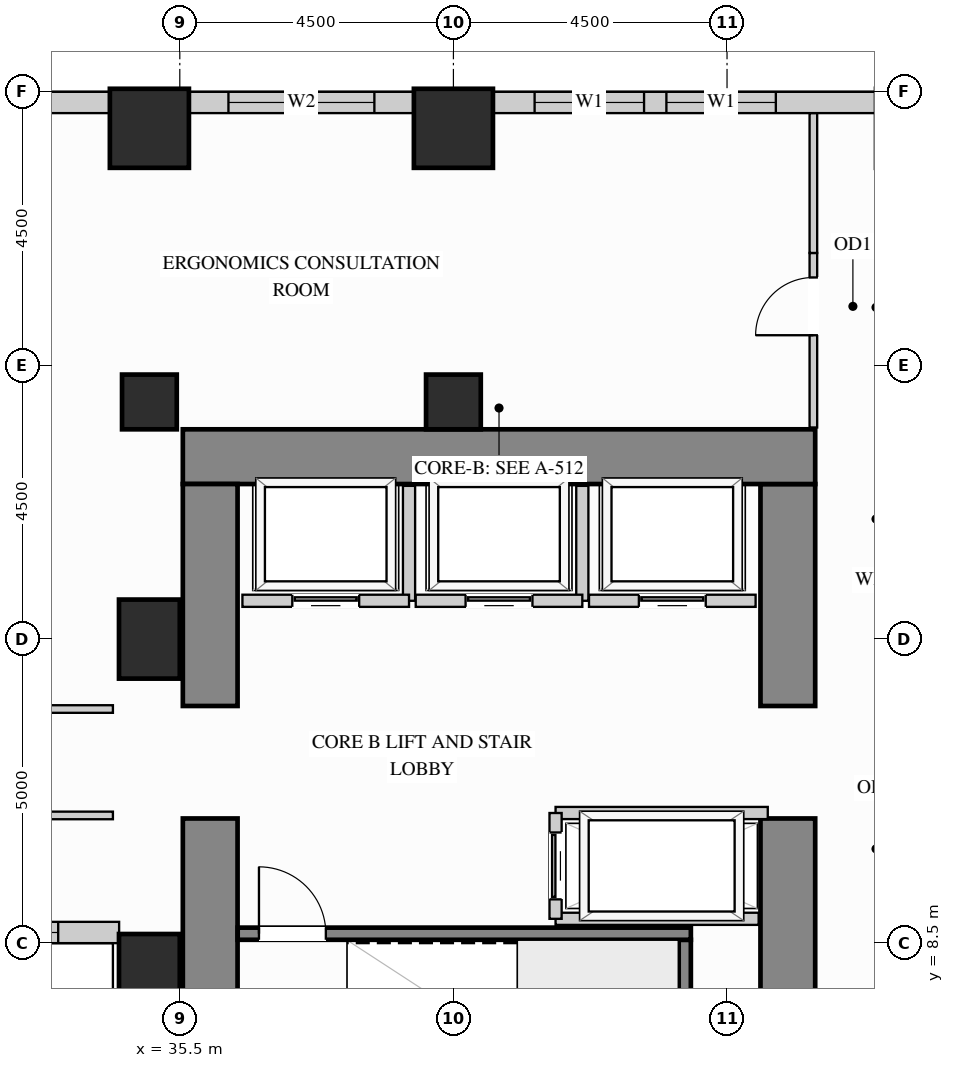
"""IFC4 building model, lengths in metres.
Left out: names, types, materials, properties, quantities, classifications, styles, units other than length and angle.
Written with IfcOpenShell. Run it as: python <this file> out.ifc"""

import sys

from ifc_helpers import new_model, si_unit, direction, frame, frame_2d, origin, origin_2d, place, context, subcontext, project, spatial, rectangle, extrude, source, transform, mapped, element, fill, save


model = new_model("IFC4")
c1 = context("Model", 3, precision=1e-05, world=origin(), true_north=direction((0.0, 1.0)))
c2 = subcontext(c1, "Body", "Model", "MODEL_VIEW")
j1 = project(units=[si_unit("LENGTHUNIT", "METRE"), si_unit("PLANEANGLEUNIT", "RADIAN")], contexts=[c1])
p1 = place(None, origin())
s1 = spatial("IfcSite", under=j1, at=p1, CompositionType="ELEMENT")
p2 = place(p1, origin())
s2 = spatial("IfcBuilding", under=s1, at=p2, CompositionType="ELEMENT")
p3 = place(p2, frame((0.0, 0.0, 33.3)))
s3 = spatial("IfcBuildingStorey", under=s2, at=p3, CompositionType="ELEMENT", Elevation=33.3)
m1 = source(origin(), c2, "Body", "SweptSolid", [
    extrude(rectangle(XDim=0.9, YDim=0.9, at=origin_2d()), origin(), (0.0, 0.0, 1.0), 3.38),
])
for number, where, z_axis, x_axis in (
    (1, (35.0, 17.4, 0.0), (0.0, 0.0, 1.0), (1.0, 0.0, 0.0)),
    (2, (40.0, 17.4, 0.0), (0.0, 0.0, 1.0), (1.0, 0.0, 0.0)),
):
    element("IfcColumn", number, at=place(p3, frame(where, z_axis=z_axis, x_axis=x_axis)), inside=s3, PredefinedType="COLUMN", context=c2, shape_type="MappedRepresentation", body=[
        mapped(m1, transform((0.0, 0.0, 0.0), x_axis=(1.0, 0.0, 0.0), y_axis=(0.0, 1.0, 0.0), z_axis=(0.0, 0.0, 1.0))),
    ])
m2 = source(origin(), c2, "Body", "SweptSolid", [
    extrude(rectangle(XDim=1.0, YDim=1.3, at=origin_2d()), origin(), (0.0, 0.0, 1.0), 3.38),
])
for number, where, z_axis, x_axis in (
    (3, (35.0, 13.5, 0.0), (0.0, 0.0, 1.0), (1.0, 0.0, 0.0)),
    (4, (35.0, 8.0, 0.0), (0.0, 0.0, 1.0), (1.0, 0.0, 0.0)),
):
    element("IfcColumn", number, at=place(p3, frame(where, z_axis=z_axis, x_axis=x_axis)), inside=s3, PredefinedType="COLUMN", context=c2, shape_type="MappedRepresentation", body=[
        mapped(m2, transform((0.0, 0.0, 0.0), x_axis=(1.0, 0.0, 0.0), y_axis=(0.0, 1.0, 0.0), z_axis=(0.0, 0.0, 1.0))),
    ])
m3 = source(origin(), c2, "Body", "SweptSolid", [
    extrude(rectangle(XDim=1.3, YDim=1.3, at=origin_2d()), origin(), (0.0, 0.0, 1.0), 3.38),
])
for number, where, z_axis, x_axis in (
    (5, (35.0, 21.9, 0.0), (0.0, 0.0, 1.0), (1.0, 0.0, 0.0)),
    (6, (40.0, 21.9, 0.0), (0.0, 0.0, 1.0), (1.0, 0.0, 0.0)),
):
    element("IfcColumn", number, at=place(p3, frame(where, z_axis=z_axis, x_axis=x_axis)), inside=s3, PredefinedType="COLUMN", context=c2, shape_type="MappedRepresentation", body=[
        mapped(m3, transform((0.0, 0.0, 0.0), x_axis=(1.0, 0.0, 0.0), y_axis=(0.0, 1.0, 0.0), z_axis=(0.0, 0.0, 1.0))),
    ])
m4 = source(origin(), c2, "Body", "SweptSolid", [
    extrude(rectangle(XDim=5.6, YDim=0.9, at=frame_2d((2.8, 0.0))), origin(), (0.0, 0.0, 1.0), 3.38),
])
p4 = place(p3, frame((45.5, 4.95, 0.0), z_axis=(0.0, 0.0, 1.0), x_axis=(0.0, 1.0, 0.0)))
e7 = element("IfcWall", 7, at=p4, inside=s3, PredefinedType="SHEAR", context=c2, shape_type="MappedRepresentation", body=[
    mapped(m4, transform((0.0, 0.0, 0.0), x_axis=(1.0, 0.0, 0.0), y_axis=(0.0, 1.0, 0.0), z_axis=(0.0, 0.0, 1.0))),
])
m5 = source(origin(), c2, "Body", "SweptSolid", [
    extrude(rectangle(XDim=3.65, YDim=0.9, at=frame_2d((1.825, 0.0))), origin(), (0.0, 0.0, 1.0), 3.38),
])
p5 = place(p3, frame((45.5, 12.4, 0.0), z_axis=(0.0, 0.0, 1.0), x_axis=(0.0, 1.0, 0.0)))
e8 = element("IfcWall", 8, at=p5, inside=s3, PredefinedType="SHEAR", context=c2, shape_type="MappedRepresentation", body=[
    mapped(m5, transform((0.0, 0.0, 0.0), x_axis=(1.0, 0.0, 0.0), y_axis=(0.0, 1.0, 0.0), z_axis=(0.0, 0.0, 1.0))),
])
m6 = source(origin(), c2, "Body", "SweptSolid", [
    extrude(rectangle(XDim=10.4, YDim=0.9, at=frame_2d((5.2, 0.0))), origin(), (0.0, 0.0, 1.0), 3.38),
])
p6 = place(p3, frame((35.55, 16.5, 0.0), z_axis=(0.0, 0.0, 1.0), x_axis=(1.0, 0.0, 0.0)))
e9 = element("IfcWall", 9, at=p6, inside=s3, PredefinedType="SHEAR", context=c2, shape_type="MappedRepresentation", body=[
    mapped(m6, transform((0.0, 0.0, 0.0), x_axis=(1.0, 0.0, 0.0), y_axis=(0.0, 1.0, 0.0), z_axis=(0.0, 0.0, 1.0))),
])
p7 = place(p3, frame((36.0, 4.95, 0.0), z_axis=(0.0, 0.0, 1.0), x_axis=(0.0, 1.0, 0.0)))
e10 = element("IfcWall", 10, at=p7, inside=s3, PredefinedType="SHEAR", context=c2, shape_type="MappedRepresentation", body=[
    mapped(m4, transform((0.0, 0.0, 0.0), x_axis=(1.0, 0.0, 0.0), y_axis=(0.0, 1.0, 0.0), z_axis=(0.0, 0.0, 1.0))),
])
p8 = place(p3, frame((36.0, 12.4, 0.0), z_axis=(0.0, 0.0, 1.0), x_axis=(0.0, 1.0, 0.0)))
e11 = element("IfcWall", 11, at=p8, inside=s3, PredefinedType="SHEAR", context=c2, shape_type="MappedRepresentation", body=[
    mapped(m5, transform((0.0, 0.0, 0.0), x_axis=(1.0, 0.0, 0.0), y_axis=(0.0, 1.0, 0.0), z_axis=(0.0, 0.0, 1.0))),
])
p9 = place(p3, frame((30.998, 8.675, 0.0), z_axis=(0.0, 0.0, 1.0), x_axis=(1.0, 0.0, 0.0)))
e12 = element("IfcWall", 12, at=p9, inside=s3, PredefinedType="SOLIDWALL", context=c2, shape_type="SweptSolid", body=[
    extrude(rectangle(XDim=3.504, YDim=0.35, at=frame_2d((1.752, 0.0))), origin(), (0.0, 0.0, 1.0), 3.365),
])
p10 = place(p9, frame((1.002, 0.0, 0.78)))
e13 = element("IfcOpeningElement", 13, at=p10, cuts=e12, PredefinedType="OPENING", context=c2, shape_type="SweptSolid", body=[
    extrude(rectangle(XDim=1.5, YDim=2.0, at=frame_2d((0.75, 1.0))), frame((0.0, 0.185, 0.0), z_axis=(0.0, -1.0, 0.0), x_axis=(1.0, 0.0, 0.0)), (0.0, 0.0, 1.0), 0.37),
])
p11 = place(p3, frame((46.952, 22.325, 0.0), z_axis=(0.0, 0.0, 1.0), x_axis=(-1.0, 0.0, 0.0)))
e14 = element("IfcWall", 14, at=p11, inside=s3, PredefinedType="SOLIDWALL", context=c2, shape_type="SweptSolid", body=[
    extrude(rectangle(XDim=6.304, YDim=0.35, at=frame_2d((3.152, 0.0))), origin(), (0.0, 0.0, 1.0), 2.51),
])
p12 = place(p11, frame((1.649, 0.0, 0.78)))
e15 = element("IfcOpeningElement", 15, at=p12, cuts=e14, PredefinedType="OPENING", context=c2, shape_type="SweptSolid", body=[
    extrude(rectangle(XDim=1.8, YDim=1.55, at=frame_2d((0.9, 0.775))), frame((0.0, 0.185, 0.0), z_axis=(0.0, -1.0, 0.0), x_axis=(1.0, 0.0, 0.0)), (0.0, 0.0, 1.0), 0.37),
])
p13 = place(p11, frame((3.817, 0.0, 0.78)))
e16 = element("IfcOpeningElement", 16, at=p13, cuts=e14, PredefinedType="OPENING", context=c2, shape_type="SweptSolid", body=[
    extrude(rectangle(XDim=1.8, YDim=1.55, at=frame_2d((0.9, 0.775))), frame((0.0, 0.185, 0.0), z_axis=(0.0, -1.0, 0.0), x_axis=(1.0, 0.0, 0.0)), (0.0, 0.0, 1.0), 0.37),
])
p14 = place(p3, frame((39.352, 22.325, 0.0), z_axis=(0.0, 0.0, 1.0), x_axis=(-1.0, 0.0, 0.0)))
e17 = element("IfcWall", 17, at=p14, inside=s3, PredefinedType="SOLIDWALL", context=c2, shape_type="SweptSolid", body=[
    extrude(rectangle(XDim=3.704, YDim=0.35, at=frame_2d((1.852, 0.0))), origin(), (0.0, 0.0, 1.0), 2.51),
])
p15 = place(p14, frame((0.652, 0.0, 0.78)))
e18 = element("IfcOpeningElement", 18, at=p15, cuts=e17, PredefinedType="OPENING", context=c2, shape_type="SweptSolid", body=[
    extrude(rectangle(XDim=2.4, YDim=1.55, at=frame_2d((1.2, 0.775))), frame((0.0, 0.185, 0.0), z_axis=(0.0, -1.0, 0.0), x_axis=(1.0, 0.0, 0.0)), (0.0, 0.0, 1.0), 0.37),
])
p16 = place(p3, frame((34.352, 22.325, 0.0), z_axis=(0.0, 0.0, 1.0), x_axis=(-1.0, 0.0, 0.0)))
e19 = element("IfcWall", 19, at=p16, inside=s3, PredefinedType="SOLIDWALL", context=c2, shape_type="SweptSolid", body=[
    extrude(rectangle(XDim=14.854, YDim=0.35, at=frame_2d((7.427, 0.0))), origin(), (0.0, 0.0, 1.0), 3.365),
])
p17 = place(p16, frame((4.058, 0.0, 0.78)))
e20 = element("IfcOpeningElement", 20, at=p17, cuts=e19, PredefinedType="OPENING", context=c2, shape_type="SweptSolid", body=[
    extrude(rectangle(XDim=1.5, YDim=2.0, at=frame_2d((0.75, 1.0))), frame((0.0, 0.185, 0.0), z_axis=(0.0, -1.0, 0.0), x_axis=(1.0, 0.0, 0.0)), (0.0, 0.0, 1.0), 0.37),
])
p18 = place(p16, frame((9.296, 0.0, 0.78)))
e21 = element("IfcOpeningElement", 21, at=p18, cuts=e19, PredefinedType="OPENING", context=c2, shape_type="SweptSolid", body=[
    extrude(rectangle(XDim=1.5, YDim=2.0, at=frame_2d((0.75, 1.0))), frame((0.0, 0.185, 0.0), z_axis=(0.0, -1.0, 0.0), x_axis=(1.0, 0.0, 0.0)), (0.0, 0.0, 1.0), 0.37),
])
p19 = place(p3, frame((45.92, 16.98, 0.0), z_axis=(0.0, 0.0, 1.0), x_axis=(0.0, 1.0, 0.0)))
e22 = element("IfcWall", 22, at=p19, inside=s3, PredefinedType="PARTITIONING", context=c2, shape_type="SweptSolid", body=[
    extrude(rectangle(XDim=2.87, YDim=0.125, at=frame_2d((1.435, 0.0))), origin(), (0.0, 0.0, 1.0), 3.365),
])
p20 = place(p19, frame((1.517, 0.0, 0.0)))
e23 = element("IfcOpeningElement", 23, at=p20, cuts=e22, PredefinedType="OPENING", context=c2, shape_type="SweptSolid", body=[
    extrude(rectangle(XDim=0.95, YDim=2.15, at=frame_2d((0.475, 1.075))), frame((0.0, 0.073, 0.0), z_axis=(0.0, -1.0, 0.0), x_axis=(1.0, 0.0, 0.0)), (0.0, 0.0, 1.0), 0.145),
])
m7 = source(origin(), c2, "Body", "SweptSolid", [
    extrude(rectangle(XDim=2.298, YDim=0.125, at=frame_2d((1.149, 0.0))), origin(), (0.0, 0.0, 1.0), 3.365),
])
p21 = place(p3, frame((45.92, 19.85, 0.0), z_axis=(0.0, 0.0, 1.0), x_axis=(0.0, 1.0, 0.0)))
e24 = element("IfcWall", 24, at=p21, inside=s3, PredefinedType="PARTITIONING", context=c2, shape_type="MappedRepresentation", body=[
    mapped(m7, transform((0.0, 0.0, 0.0), x_axis=(1.0, 0.0, 0.0), y_axis=(0.0, 1.0, 0.0), z_axis=(0.0, 0.0, 1.0))),
])
p22 = place(p3, frame((29.85, 12.35, 0.0), z_axis=(0.0, 0.0, 1.0), x_axis=(1.0, 0.0, 0.0)))
e25 = element("IfcWall", 25, at=p22, inside=s3, PredefinedType="PARTITIONING", context=c2, shape_type="SweptSolid", body=[
    extrude(rectangle(XDim=4.55, YDim=0.125, at=frame_2d((2.275, 0.0))), origin(), (0.0, 0.0, 1.0), 3.365),
])
p23 = place(p22, frame((1.8, 0.0, 0.0)))
e26 = element("IfcOpeningElement", 26, at=p23, cuts=e25, PredefinedType="OPENING", context=c2, shape_type="SweptSolid", body=[
    extrude(rectangle(XDim=0.95, YDim=2.15, at=frame_2d((0.475, 1.075))), frame((0.0, 0.073, 0.0), z_axis=(0.0, -1.0, 0.0), x_axis=(1.0, 0.0, 0.0)), (0.0, 0.0, 1.0), 0.145),
])
p24 = place(p3, frame((19.5, 10.6, 0.0), z_axis=(0.0, 0.0, 1.0), x_axis=(1.0, 0.0, 0.0)))
e27 = element("IfcWall", 27, at=p24, inside=s3, PredefinedType="PARTITIONING", context=c2, shape_type="SweptSolid", body=[
    extrude(rectangle(XDim=14.9, YDim=0.125, at=frame_2d((7.45, 0.0))), origin(), (0.0, 0.0, 1.0), 3.365),
])
p25 = place(p24, frame((6.975, 0.0, 0.0)))
e28 = element("IfcOpeningElement", 28, at=p25, cuts=e27, PredefinedType="OPENING", context=c2, shape_type="SweptSolid", body=[
    extrude(rectangle(XDim=0.95, YDim=2.15, at=frame_2d((0.475, 1.075))), frame((0.0, 0.073, 0.0), z_axis=(0.0, -1.0, 0.0), x_axis=(1.0, 0.0, 0.0)), (0.0, 0.0, 1.0), 0.145),
])
m8 = source(origin(), c2, "Body", "SweptSolid", [
    extrude(rectangle(XDim=1.89, YDim=0.2, at=frame_2d((0.945, 0.0))), origin(), (0.0, 0.0, 1.0), 3.365),
])
p26 = place(p3, frame((39.27, 14.13, 0.0), z_axis=(0.0, 0.0, 1.0), x_axis=(0.0, 1.0, 0.0)))
e29 = element("IfcWall", 29, at=p26, inside=s3, PredefinedType="PARTITIONING", context=c2, shape_type="MappedRepresentation", body=[
    mapped(m8, transform((0.0, 0.0, 0.0), x_axis=(1.0, 0.0, 0.0), y_axis=(0.0, 1.0, 0.0), z_axis=(0.0, 0.0, 1.0))),
])
p27 = place(p3, frame((36.53, 14.13, 0.0), z_axis=(0.0, 0.0, 1.0), x_axis=(1.0, 0.0, 0.0)))
e30 = element("IfcWall", 30, at=p27, inside=s3, PredefinedType="PARTITIONING", context=c2, shape_type="SweptSolid", body=[
    extrude(rectangle(XDim=2.74, YDim=0.2, at=frame_2d((1.37, 0.0))), origin(), (0.0, 0.0, 1.0), 3.365),
])
p28 = place(p27, frame((0.82, 0.0, 0.0)))
e31 = element("IfcOpeningElement", 31, at=p28, cuts=e30, PredefinedType="OPENING", context=c2, shape_type="SweptSolid", body=[
    extrude(rectangle(XDim=1.1, YDim=2.2, at=frame_2d((0.55, 1.1))), frame((0.0, 0.11, 0.0), z_axis=(0.0, -1.0, 0.0), x_axis=(1.0, 0.0, 0.0)), (0.0, 0.0, 1.0), 0.22),
])
p29 = place(p3, frame((42.12, 14.13, 0.0), z_axis=(0.0, 0.0, 1.0), x_axis=(0.0, 1.0, 0.0)))
e32 = element("IfcWall", 32, at=p29, inside=s3, PredefinedType="PARTITIONING", context=c2, shape_type="MappedRepresentation", body=[
    mapped(m8, transform((0.0, 0.0, 0.0), x_axis=(1.0, 0.0, 0.0), y_axis=(0.0, 1.0, 0.0), z_axis=(0.0, 0.0, 1.0))),
])
p30 = place(p3, frame((39.38, 14.13, 0.0), z_axis=(0.0, 0.0, 1.0), x_axis=(1.0, 0.0, 0.0)))
e33 = element("IfcWall", 33, at=p30, inside=s3, PredefinedType="PARTITIONING", context=c2, shape_type="SweptSolid", body=[
    extrude(rectangle(XDim=2.74, YDim=0.2, at=frame_2d((1.37, 0.0))), origin(), (0.0, 0.0, 1.0), 3.365),
])
p31 = place(p30, frame((0.82, 0.0, 0.0)))
e34 = element("IfcOpeningElement", 34, at=p31, cuts=e33, PredefinedType="OPENING", context=c2, shape_type="SweptSolid", body=[
    extrude(rectangle(XDim=1.1, YDim=2.2, at=frame_2d((0.55, 1.1))), frame((0.0, 0.11, 0.0), z_axis=(0.0, -1.0, 0.0), x_axis=(1.0, 0.0, 0.0)), (0.0, 0.0, 1.0), 0.22),
])
p32 = place(p3, frame((42.23, 14.13, 0.0), z_axis=(0.0, 0.0, 1.0), x_axis=(1.0, 0.0, 0.0)))
e35 = element("IfcWall", 35, at=p32, inside=s3, PredefinedType="PARTITIONING", context=c2, shape_type="SweptSolid", body=[
    extrude(rectangle(XDim=2.74, YDim=0.2, at=frame_2d((1.37, 0.0))), origin(), (0.0, 0.0, 1.0), 3.365),
])
p33 = place(p32, frame((0.82, 0.0, 0.0)))
e36 = element("IfcOpeningElement", 36, at=p33, cuts=e35, PredefinedType="OPENING", context=c2, shape_type="SweptSolid", body=[
    extrude(rectangle(XDim=1.1, YDim=2.2, at=frame_2d((0.55, 1.1))), frame((0.0, 0.11, 0.0), z_axis=(0.0, -1.0, 0.0), x_axis=(1.0, 0.0, 0.0)), (0.0, 0.0, 1.0), 0.22),
])
m9 = source(origin(), c2, "Body", "SweptSolid", [
    extrude(rectangle(XDim=3.49, YDim=0.2, at=frame_2d((1.745, 0.0))), origin(), (0.0, 0.0, 1.0), 3.365),
])
p34 = place(p3, frame((41.68, 10.64, 0.0), z_axis=(0.0, 0.0, 1.0), x_axis=(1.0, 0.0, 0.0)))
e37 = element("IfcWall", 37, at=p34, inside=s3, PredefinedType="PARTITIONING", context=c2, shape_type="MappedRepresentation", body=[
    mapped(m9, transform((0.0, 0.0, 0.0), x_axis=(1.0, 0.0, 0.0), y_axis=(0.0, 1.0, 0.0), z_axis=(0.0, 0.0, 1.0))),
])
m10 = source(origin(), c2, "Body", "SweptSolid", [
    extrude(rectangle(XDim=3.34, YDim=0.2, at=frame_2d((1.67, 0.0))), origin(), (0.0, 0.0, 1.0), 3.365),
])
p35 = place(p3, frame((41.68, 8.9, 0.0), z_axis=(0.0, 0.0, 1.0), x_axis=(1.0, 0.0, 0.0)))
e38 = element("IfcWall", 38, at=p35, inside=s3, PredefinedType="PARTITIONING", context=c2, shape_type="MappedRepresentation", body=[
    mapped(m10, transform((0.0, 0.0, 0.0), x_axis=(1.0, 0.0, 0.0), y_axis=(0.0, 1.0, 0.0), z_axis=(0.0, 0.0, 1.0))),
])
p36 = place(p3, frame((41.68, 8.9, 0.0), z_axis=(0.0, 0.0, 1.0), x_axis=(0.0, 1.0, 0.0)))
e39 = element("IfcWall", 39, at=p36, inside=s3, PredefinedType="PARTITIONING", context=c2, shape_type="SweptSolid", body=[
    extrude(rectangle(XDim=1.74, YDim=0.2, at=frame_2d((0.87, 0.0))), origin(), (0.0, 0.0, 1.0), 3.365),
])
p37 = place(p36, frame((0.32, 0.0, 0.0)))
e40 = element("IfcOpeningElement", 40, at=p37, cuts=e39, PredefinedType="OPENING", context=c2, shape_type="SweptSolid", body=[
    extrude(rectangle(XDim=1.1, YDim=2.2, at=frame_2d((0.55, 1.1))), frame((0.0, 0.11, 0.0), z_axis=(0.0, -1.0, 0.0), x_axis=(1.0, 0.0, 0.0)), (0.0, 0.0, 1.0), 0.22),
])
m11 = source(origin(), c2, "Body", "SweptSolid", [
    extrude(rectangle(XDim=3.603, YDim=0.2, at=frame_2d((1.802, 0.0))), origin(), (0.0, 0.0, 1.0), 3.38),
])
p38 = place(p3, frame((43.805, 4.952, 0.0), z_axis=(0.0, 0.0, 1.0), x_axis=(0.0, 1.0, 0.0)))
e41 = element("IfcWall", 41, at=p38, inside=s3, PredefinedType="SHEAR", context=c2, shape_type="MappedRepresentation", body=[
    mapped(m11, transform((0.0, 0.0, 0.0), x_axis=(1.0, 0.0, 0.0), y_axis=(0.0, 1.0, 0.0), z_axis=(0.0, 0.0, 1.0))),
])
p39 = place(p3, frame((36.452, 8.655, 0.0), z_axis=(0.0, 0.0, 1.0), x_axis=(1.0, 0.0, 0.0)))
e42 = element("IfcWall", 42, at=p39, inside=s3, PredefinedType="SHEAR", context=c2, shape_type="SweptSolid", body=[
    extrude(rectangle(XDim=7.453, YDim=0.2, at=frame_2d((3.727, 0.0))), origin(), (0.0, 0.0, 1.0), 3.38),
])
p40 = place(p39, frame((0.35, 0.0, 0.0)))
e43 = element("IfcOpeningElement", 43, at=p40, cuts=e42, PredefinedType="OPENING", context=c2, shape_type="SweptSolid", body=[
    extrude(rectangle(XDim=1.1, YDim=2.15, at=frame_2d((0.55, 1.075))), frame((0.0, 0.11, 0.0), z_axis=(0.0, -1.0, 0.0), x_axis=(1.0, 0.0, 0.0)), (0.0, 0.0, 1.0), 0.22),
])
m12 = source(origin(), c2, "Body", "SweptSolid", [
    extrude(rectangle(XDim=1.1, YDim=2.2, at=frame_2d((0.55, 1.1))), frame((0.0, 0.025, 0.0), z_axis=(0.0, -1.0, 0.0), x_axis=(1.0, 0.0, 0.0)), (0.0, 0.0, 1.0), 0.05),
])
p41 = place(p28, origin())
e44 = element("IfcDoor", 44, at=p41, inside=s3, OperationType="SLIDING_TO_LEFT", PredefinedType="DOOR", context=c2, shape_type="MappedRepresentation", body=[
    mapped(m12, transform((0.0, 0.0, 0.0), x_axis=(1.0, 0.0, 0.0), y_axis=(0.0, 1.0, 0.0), z_axis=(0.0, 0.0, 1.0))),
])
fill(e31, e44)
p42 = place(p31, origin())
e45 = element("IfcDoor", 45, at=p42, inside=s3, OperationType="SLIDING_TO_LEFT", PredefinedType="DOOR", context=c2, shape_type="MappedRepresentation", body=[
    mapped(m12, transform((0.0, 0.0, 0.0), x_axis=(1.0, 0.0, 0.0), y_axis=(0.0, 1.0, 0.0), z_axis=(0.0, 0.0, 1.0))),
])
fill(e34, e45)
p43 = place(p33, origin())
e46 = element("IfcDoor", 46, at=p43, inside=s3, OperationType="SLIDING_TO_LEFT", PredefinedType="DOOR", context=c2, shape_type="MappedRepresentation", body=[
    mapped(m12, transform((0.0, 0.0, 0.0), x_axis=(1.0, 0.0, 0.0), y_axis=(0.0, 1.0, 0.0), z_axis=(0.0, 0.0, 1.0))),
])
fill(e36, e46)
p44 = place(p37, origin())
e47 = element("IfcDoor", 47, at=p44, inside=s3, OperationType="SLIDING_TO_LEFT", PredefinedType="DOOR", context=c2, shape_type="MappedRepresentation", body=[
    mapped(m12, transform((0.0, 0.0, 0.0), x_axis=(1.0, 0.0, 0.0), y_axis=(0.0, 1.0, 0.0), z_axis=(0.0, 0.0, 1.0))),
])
fill(e40, e47)
m13 = source(origin(), c2, "Body", "SweptSolid", [
    extrude(rectangle(XDim=0.95, YDim=2.15, at=frame_2d((0.475, 1.075))), frame((0.0, 0.025, 0.0), z_axis=(0.0, -1.0, 0.0), x_axis=(1.0, 0.0, 0.0)), (0.0, 0.0, 1.0), 0.05),
])
p45 = place(p20, origin())
e48 = element("IfcDoor", 48, at=p45, inside=s3, OperationType="SINGLE_SWING_LEFT", PredefinedType="DOOR", context=c2, shape_type="MappedRepresentation", body=[
    mapped(m13, transform((0.0, 0.0, 0.0), x_axis=(1.0, 0.0, 0.0), y_axis=(0.0, 1.0, 0.0), z_axis=(0.0, 0.0, 1.0))),
])
fill(e23, e48)
m14 = source(origin(), c2, "Body", "SweptSolid", [
    extrude(rectangle(XDim=1.1, YDim=2.15, at=frame_2d((0.55, 1.075))), frame((0.0, 0.025, 0.0), z_axis=(0.0, -1.0, 0.0), x_axis=(1.0, 0.0, 0.0)), (0.0, 0.0, 1.0), 0.05),
])
p46 = place(p40, origin())
e49 = element("IfcDoor", 49, at=p46, inside=s3, OperationType="SINGLE_SWING_LEFT", PredefinedType="DOOR", context=c2, shape_type="MappedRepresentation", body=[
    mapped(m14, transform((0.0, 0.0, 0.0), x_axis=(1.0, 0.0, 0.0), y_axis=(0.0, 1.0, 0.0), z_axis=(0.0, 0.0, 1.0))),
])
fill(e43, e49)
m15 = source(origin(), c2, "Body", "SweptSolid", [
    extrude(rectangle(XDim=1.8, YDim=1.55, at=frame_2d((0.9, 0.775))), frame((0.0, 0.03, 0.0), z_axis=(0.0, -1.0, 0.0), x_axis=(1.0, 0.0, 0.0)), (0.0, 0.0, 1.0), 0.06),
])
p47 = place(p12, origin())
e50 = element("IfcWindow", 50, at=p47, inside=s3, PartitioningType="SINGLE_PANEL", PredefinedType="WINDOW", context=c2, shape_type="MappedRepresentation", body=[
    mapped(m15, transform((0.0, 0.0, 0.0), x_axis=(1.0, 0.0, 0.0), y_axis=(0.0, 1.0, 0.0), z_axis=(0.0, 0.0, 1.0))),
])
fill(e15, e50)
p48 = place(p13, origin())
e51 = element("IfcWindow", 51, at=p48, inside=s3, PartitioningType="SINGLE_PANEL", PredefinedType="WINDOW", context=c2, shape_type="MappedRepresentation", body=[
    mapped(m15, transform((0.0, 0.0, 0.0), x_axis=(1.0, 0.0, 0.0), y_axis=(0.0, 1.0, 0.0), z_axis=(0.0, 0.0, 1.0))),
])
fill(e16, e51)
m16 = source(origin(), c2, "Body", "SweptSolid", [
    extrude(rectangle(XDim=2.4, YDim=1.55, at=frame_2d((1.2, 0.775))), frame((0.0, 0.03, 0.0), z_axis=(0.0, -1.0, 0.0), x_axis=(1.0, 0.0, 0.0)), (0.0, 0.0, 1.0), 0.06),
])
p49 = place(p15, origin())
e52 = element("IfcWindow", 52, at=p49, inside=s3, PartitioningType="SINGLE_PANEL", PredefinedType="WINDOW", context=c2, shape_type="MappedRepresentation", body=[
    mapped(m16, transform((0.0, 0.0, 0.0), x_axis=(1.0, 0.0, 0.0), y_axis=(0.0, 1.0, 0.0), z_axis=(0.0, 0.0, 1.0))),
])
fill(e18, e52)
m17 = source(origin(), c2, "Body", "SweptSolid", [
    extrude(rectangle(XDim=1.5, YDim=2.0, at=frame_2d((0.75, 1.0))), frame((0.0, 0.03, 0.0), z_axis=(0.0, -1.0, 0.0), x_axis=(1.0, 0.0, 0.0)), (0.0, 0.0, 1.0), 0.06),
])
p50 = place(p10, origin())
e53 = element("IfcWindow", 53, at=p50, inside=s3, PartitioningType="SINGLE_PANEL", PredefinedType="WINDOW", context=c2, shape_type="MappedRepresentation", body=[
    mapped(m17, transform((0.0, 0.0, 0.0), x_axis=(1.0, 0.0, 0.0), y_axis=(0.0, 1.0, 0.0), z_axis=(0.0, 0.0, 1.0))),
])
fill(e13, e53)
save(model, sys.argv[1])
